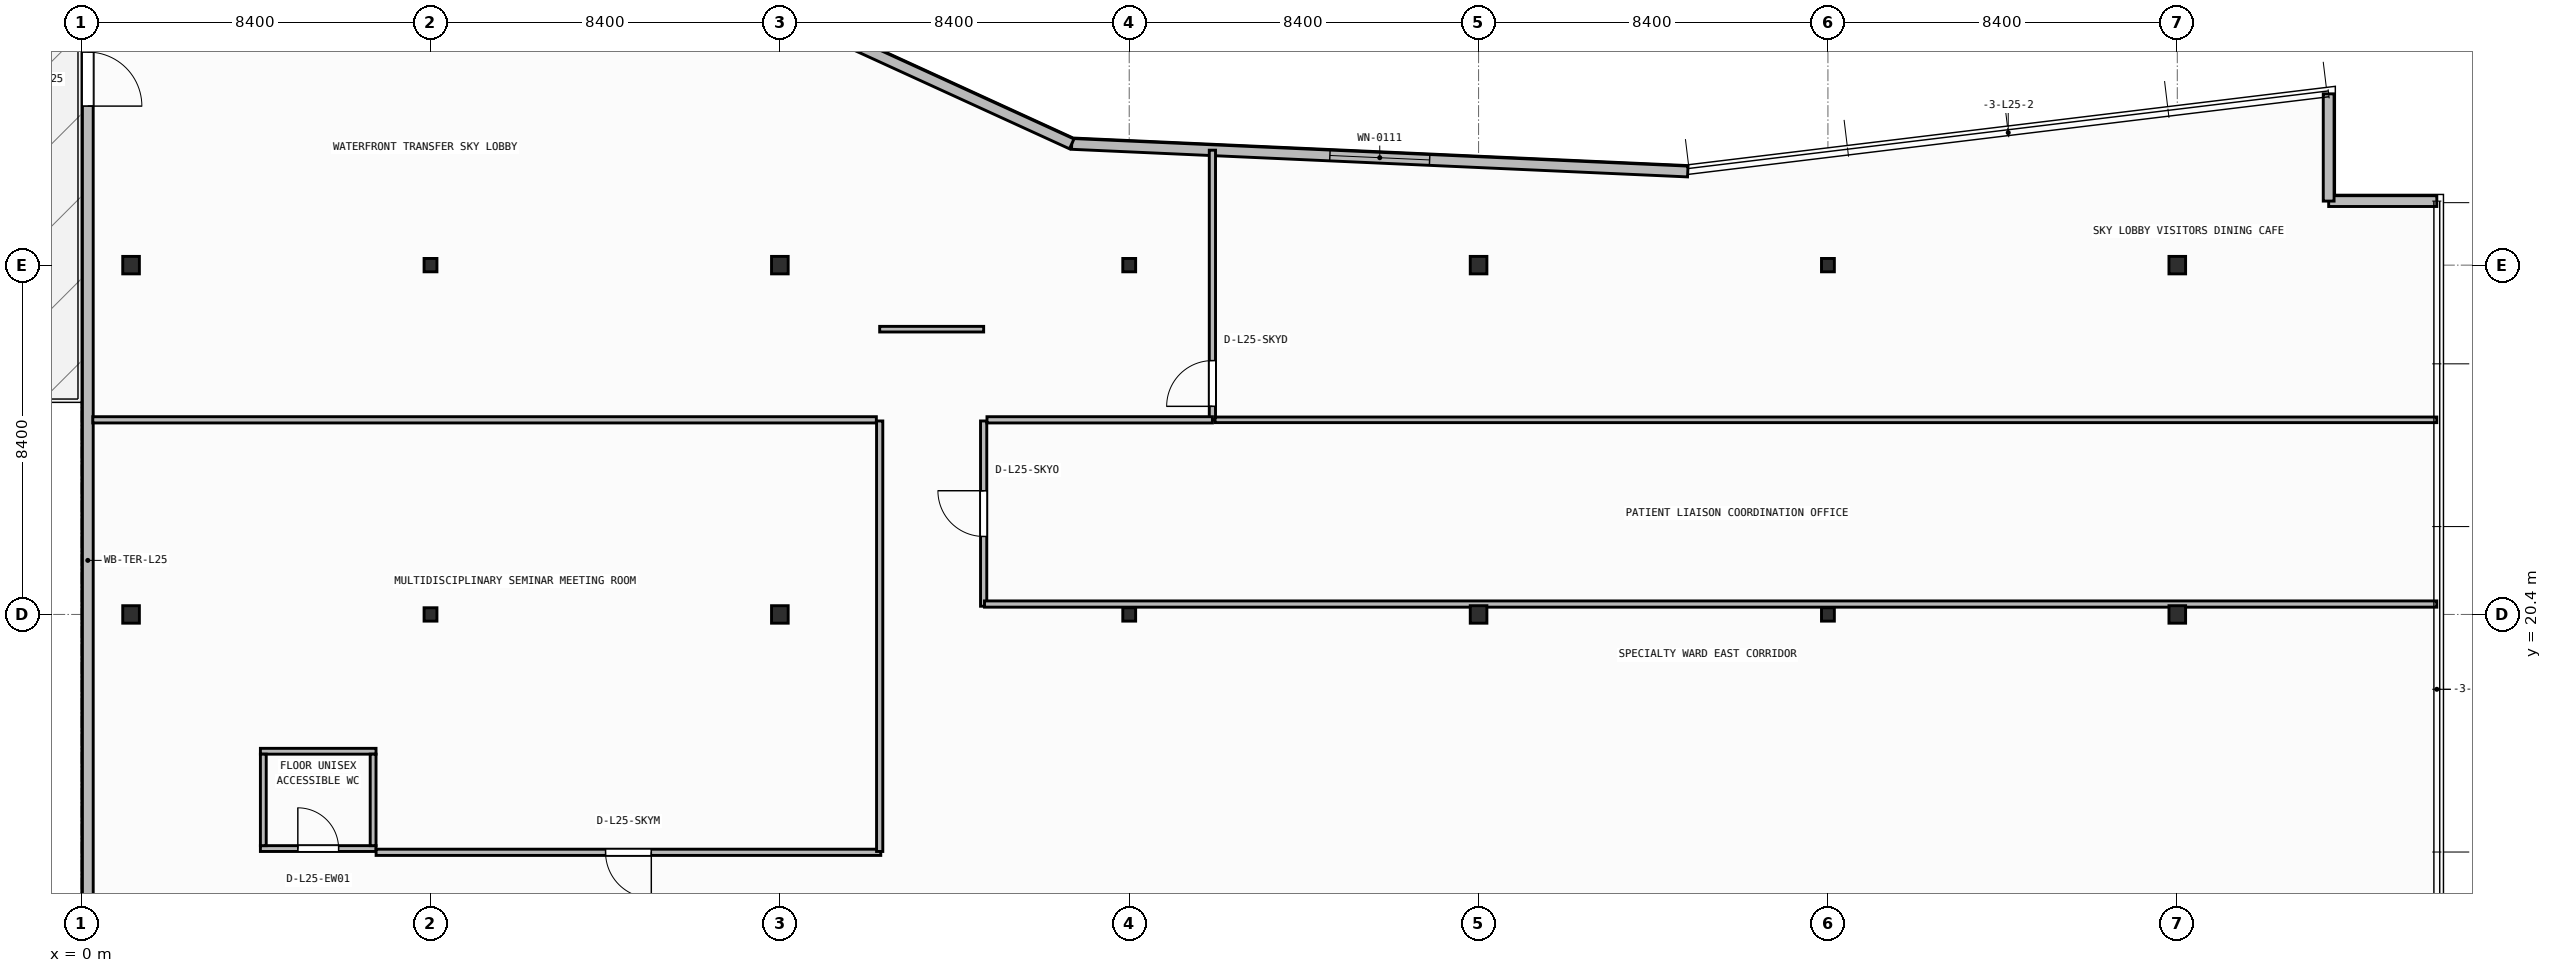
"""IFC4 building model, lengths in metres.
Left out: names, types, materials, properties, quantities, classifications, styles, units other than length and angle.
Written with IfcOpenShell. Run it as: python <this file> out.ifc"""

import sys

from ifc_helpers import new_model, si_unit, direction, frame, frame_2d, origin, origin_2d, place, context, subcontext, project, spatial, rectangle, i_section, extrude, element, fill, save


model = new_model("IFC4")
c1 = context("Model", 3, precision=1e-05, world=origin(), true_north=direction((0.0, 1.0)))
c2 = subcontext(c1, "Body", "Model", "MODEL_VIEW")
j1 = project(units=[si_unit("LENGTHUNIT", "METRE"), si_unit("PLANEANGLEUNIT", "RADIAN")], contexts=[c1])
p1 = place(None, origin())
s1 = spatial("IfcSite", under=j1, at=p1, CompositionType="ELEMENT")
p2 = place(p1, origin())
s2 = spatial("IfcBuilding", under=s1, at=p2, CompositionType="ELEMENT")
p3 = place(p2, frame((0.0, 0.0, 103.35)))
s3 = spatial("IfcBuildingStorey", under=s2, at=p3, CompositionType="ELEMENT", Elevation=103.35)
p4 = place(p3, frame((1.2, 20.4, 0.0), z_axis=(0.0, 0.0, 1.0), x_axis=(1.0, 0.0, 0.0)))
e1 = element("IfcColumn", 1, at=p4, inside=s3, PredefinedType="COLUMN", context=c2, shape_type="SweptSolid", body=[
    extrude(i_section(OverallWidth=0.4, OverallDepth=0.42, WebThickness=0.025, FlangeThickness=0.04, at=origin_2d()), origin(), (0.0, 0.0, 1.0), 3.95),
])
p5 = place(p3, frame((8.4, 20.4, 0.0), z_axis=(0.0, 0.0, 1.0), x_axis=(1.0, 0.0, 0.0)))
e2 = element("IfcColumn", 2, at=p5, inside=s3, PredefinedType="COLUMN", context=c2, shape_type="SweptSolid", body=[
    extrude(i_section(OverallWidth=0.309, OverallDepth=0.321, WebThickness=0.014, FlangeThickness=0.022, FilletRadius=0.017, at=origin_2d()), origin(), (0.0, 0.0, 1.0), 3.95),
])
p6 = place(p3, frame((16.8, 20.4, 0.0), z_axis=(0.0, 0.0, 1.0), x_axis=(1.0, 0.0, 0.0)))
e3 = element("IfcColumn", 3, at=p6, inside=s3, PredefinedType="COLUMN", context=c2, shape_type="SweptSolid", body=[
    extrude(i_section(OverallWidth=0.4, OverallDepth=0.42, WebThickness=0.025, FlangeThickness=0.04, at=origin_2d()), origin(), (0.0, 0.0, 1.0), 3.95),
])
p7 = place(p3, frame((25.2, 20.4, 0.0), z_axis=(0.0, 0.0, 1.0), x_axis=(1.0, 0.0, 0.0)))
e4 = element("IfcColumn", 4, at=p7, inside=s3, PredefinedType="COLUMN", context=c2, shape_type="SweptSolid", body=[
    extrude(i_section(OverallWidth=0.309, OverallDepth=0.321, WebThickness=0.014, FlangeThickness=0.022, FilletRadius=0.017, at=origin_2d()), origin(), (0.0, 0.0, 1.0), 3.95),
])
p8 = place(p3, frame((33.6, 20.4, 0.0), z_axis=(0.0, 0.0, 1.0), x_axis=(1.0, 0.0, 0.0)))
e5 = element("IfcColumn", 5, at=p8, inside=s3, PredefinedType="COLUMN", context=c2, shape_type="SweptSolid", body=[
    extrude(i_section(OverallWidth=0.4, OverallDepth=0.42, WebThickness=0.025, FlangeThickness=0.04, at=origin_2d()), origin(), (0.0, 0.0, 1.0), 3.95),
])
p9 = place(p3, frame((42.0, 20.4, 0.0), z_axis=(0.0, 0.0, 1.0), x_axis=(1.0, 0.0, 0.0)))
e6 = element("IfcColumn", 6, at=p9, inside=s3, PredefinedType="COLUMN", context=c2, shape_type="SweptSolid", body=[
    extrude(i_section(OverallWidth=0.309, OverallDepth=0.321, WebThickness=0.014, FlangeThickness=0.022, FilletRadius=0.017, at=origin_2d()), origin(), (0.0, 0.0, 1.0), 3.95),
])
for number, where, z_axis, x_axis in (
    (7, (50.4, 20.4, 0.0), (0.0, 0.0, 1.0), (1.0, 0.0, 0.0)),
    (8, (1.2, 28.8, 0.0), (0.0, 0.0, 1.0), (1.0, 0.0, 0.0)),
):
    element("IfcColumn", number, at=place(p3, frame(where, z_axis=z_axis, x_axis=x_axis)), inside=s3, PredefinedType="COLUMN", context=c2, shape_type="SweptSolid", body=[
        extrude(i_section(OverallWidth=0.4, OverallDepth=0.42, WebThickness=0.025, FlangeThickness=0.04, at=origin_2d()), origin(), (0.0, 0.0, 1.0), 3.95),
    ])
p10 = place(p3, frame((8.4, 28.8, 0.0), z_axis=(0.0, 0.0, 1.0), x_axis=(1.0, 0.0, 0.0)))
e9 = element("IfcColumn", 9, at=p10, inside=s3, PredefinedType="COLUMN", context=c2, shape_type="SweptSolid", body=[
    extrude(i_section(OverallWidth=0.309, OverallDepth=0.321, WebThickness=0.014, FlangeThickness=0.022, FilletRadius=0.017, at=origin_2d()), origin(), (0.0, 0.0, 1.0), 3.95),
])
p11 = place(p3, frame((16.8, 28.8, 0.0), z_axis=(0.0, 0.0, 1.0), x_axis=(1.0, 0.0, 0.0)))
e10 = element("IfcColumn", 10, at=p11, inside=s3, PredefinedType="COLUMN", context=c2, shape_type="SweptSolid", body=[
    extrude(i_section(OverallWidth=0.4, OverallDepth=0.42, WebThickness=0.025, FlangeThickness=0.04, at=origin_2d()), origin(), (0.0, 0.0, 1.0), 3.95),
])
p12 = place(p3, frame((25.2, 28.8, 0.0), z_axis=(0.0, 0.0, 1.0), x_axis=(1.0, 0.0, 0.0)))
e11 = element("IfcColumn", 11, at=p12, inside=s3, PredefinedType="COLUMN", context=c2, shape_type="SweptSolid", body=[
    extrude(i_section(OverallWidth=0.309, OverallDepth=0.321, WebThickness=0.014, FlangeThickness=0.022, FilletRadius=0.017, at=origin_2d()), origin(), (0.0, 0.0, 1.0), 3.95),
])
p13 = place(p3, frame((33.6, 28.8, 0.0), z_axis=(0.0, 0.0, 1.0), x_axis=(1.0, 0.0, 0.0)))
e12 = element("IfcColumn", 12, at=p13, inside=s3, PredefinedType="COLUMN", context=c2, shape_type="SweptSolid", body=[
    extrude(i_section(OverallWidth=0.4, OverallDepth=0.42, WebThickness=0.025, FlangeThickness=0.04, at=origin_2d()), origin(), (0.0, 0.0, 1.0), 3.95),
])
p14 = place(p3, frame((42.0, 28.8, 0.0), z_axis=(0.0, 0.0, 1.0), x_axis=(1.0, 0.0, 0.0)))
e13 = element("IfcColumn", 13, at=p14, inside=s3, PredefinedType="COLUMN", context=c2, shape_type="SweptSolid", body=[
    extrude(i_section(OverallWidth=0.309, OverallDepth=0.321, WebThickness=0.014, FlangeThickness=0.022, FilletRadius=0.017, at=origin_2d()), origin(), (0.0, 0.0, 1.0), 3.95),
])
p15 = place(p3, frame((50.4, 28.8, 0.0), z_axis=(0.0, 0.0, 1.0), x_axis=(1.0, 0.0, 0.0)))
e14 = element("IfcColumn", 14, at=p15, inside=s3, PredefinedType="COLUMN", context=c2, shape_type="SweptSolid", body=[
    extrude(i_section(OverallWidth=0.4, OverallDepth=0.42, WebThickness=0.025, FlangeThickness=0.04, at=origin_2d()), origin(), (0.0, 0.0, 1.0), 3.95),
])
p16 = place(p3, frame((56.64, 30.34, 0.0), z_axis=(0.0, 0.0, 1.0), x_axis=(-1.0, 0.0, 0.0)))
e15 = element("IfcWall", 15, at=p16, inside=s3, PredefinedType="STANDARD", context=c2, shape_type="SweptSolid", body=[
    extrude(rectangle(XDim=2.6, YDim=0.26, at=frame_2d((1.3, 0.0))), origin(), (0.0, 0.0, 1.0), 3.71),
])
p17 = place(p3, frame((54.04, 30.34, 0.0), z_axis=(0.0, 0.0, 1.0), x_axis=(0.0, 1.0, 0.0)))
e16 = element("IfcWall", 16, at=p17, inside=s3, PredefinedType="STANDARD", context=c2, shape_type="SweptSolid", body=[
    extrude(rectangle(XDim=2.579, YDim=0.26, at=frame_2d((1.29, 0.0))), origin(), (0.0, 0.0, 1.0), 3.71),
])
p18 = place(p3, frame((38.63, 31.052, 0.0), z_axis=(0.0, 0.0, 1.0), x_axis=(-0.998996592956, 0.044786239663, 0.0)))
e17 = element("IfcWall", 17, at=p18, inside=s3, PredefinedType="STANDARD", context=c2, shape_type="SweptSolid", body=[
    extrude(rectangle(XDim=14.827, YDim=0.26, at=frame_2d((7.414, 0.0))), origin(), (0.0, 0.0, 1.0), 3.71),
])
p19 = place(p18, frame((6.214, 0.0, 0.9)))
e18 = element("IfcOpeningElement", 18, at=p19, cuts=e17, PredefinedType="OPENING", context=c2, shape_type="SweptSolid", body=[
    extrude(rectangle(XDim=2.4, YDim=1.65, at=frame_2d((1.2, 0.825))), frame((0.0, 0.14, 0.0), z_axis=(0.0, -1.0, 0.0), x_axis=(1.0, 0.0, 0.0)), (0.0, 0.0, 1.0), 0.28),
])
p20 = place(p3, frame((23.818, 31.716, 0.0), z_axis=(0.0, 0.0, 1.0), x_axis=(-0.909209527513, 0.416338846471, 0.0)))
e19 = element("IfcWall", 19, at=p20, inside=s3, PredefinedType="STANDARD", context=c2, shape_type="SweptSolid", body=[
    extrude(rectangle(XDim=13.787, YDim=0.26, at=frame_2d((6.894, 0.0))), origin(), (0.0, 0.0, 1.0), 3.71),
])
p21 = place(p20, frame((5.694, 0.0, 0.9)))
e20 = element("IfcOpeningElement", 20, at=p21, cuts=e19, PredefinedType="OPENING", context=c2, shape_type="SweptSolid", body=[
    extrude(rectangle(XDim=2.4, YDim=1.65, at=frame_2d((1.2, 0.825))), frame((0.0, 0.14, 0.0), z_axis=(0.0, -1.0, 0.0), x_axis=(1.0, 0.0, 0.0)), (0.0, 0.0, 1.0), 0.28),
])
p22 = place(p3, frame((0.16, 40.64, 0.0), z_axis=(0.0, 0.0, 1.0), x_axis=(0.0, -1.0, 0.0)))
e21 = element("IfcWall", 21, at=p22, inside=s3, PredefinedType="STANDARD", context=c2, shape_type="SweptSolid", body=[
    extrude(rectangle(XDim=37.88, YDim=0.26, at=frame_2d((18.94, 0.0))), origin(), (0.0, 0.0, 1.0), 3.71),
])
p23 = place(p22, frame((6.716, 0.0, 0.0)))
e22 = element("IfcOpeningElement", 22, at=p23, cuts=e21, PredefinedType="OPENING", context=c2, shape_type="SweptSolid", body=[
    extrude(rectangle(XDim=1.3, YDim=2.15, at=frame_2d((0.65, 1.075))), frame((0.0, 0.14, 0.0), z_axis=(0.0, -1.0, 0.0), x_axis=(1.0, 0.0, 0.0)), (0.0, 0.0, 1.0), 0.28),
])
p24 = place(p3, frame((4.31, 14.77, 0.0), z_axis=(0.0, 0.0, 1.0), x_axis=(1.0, 0.0, 0.0)))
e23 = element("IfcWall", 23, at=p24, inside=s3, PredefinedType="PARTITIONING", context=c2, shape_type="SweptSolid", body=[
    extrude(rectangle(XDim=2.78, YDim=0.14, at=frame_2d((1.39, 0.0))), origin(), (0.0, 0.0, 1.0), 3.71),
])
p25 = place(p24, frame((0.9, 0.0, 0.0)))
e24 = element("IfcOpeningElement", 24, at=p25, cuts=e23, PredefinedType="OPENING", context=c2, shape_type="SweptSolid", body=[
    extrude(rectangle(XDim=0.98, YDim=2.1, at=frame_2d((0.49, 1.05))), frame((0.0, 0.08, 0.0), z_axis=(0.0, -1.0, 0.0), x_axis=(1.0, 0.0, 0.0)), (0.0, 0.0, 1.0), 0.16),
])
p26 = place(p3, frame((4.31, 17.11, 0.0), z_axis=(0.0, 0.0, 1.0), x_axis=(1.0, 0.0, 0.0)))
e25 = element("IfcWall", 25, at=p26, inside=s3, PredefinedType="PARTITIONING", context=c2, shape_type="SweptSolid", body=[
    extrude(rectangle(XDim=2.78, YDim=0.14, at=frame_2d((1.39, 0.0))), origin(), (0.0, 0.0, 1.0), 3.71),
])
for number, where, z_axis, x_axis in (
    (26, (4.38, 14.84, 0.0), (0.0, 0.0, 1.0), (0.0, 1.0, 0.0)),
    (27, (7.02, 14.84, 0.0), (0.0, 0.0, 1.0), (0.0, 1.0, 0.0)),
):
    element("IfcWall", number, at=place(p3, frame(where, z_axis=z_axis, x_axis=x_axis)), inside=s3, PredefinedType="PARTITIONING", context=c2, shape_type="SweptSolid", body=[
        extrude(rectangle(XDim=2.2, YDim=0.14, at=frame_2d((1.1, 0.0))), origin(), (0.0, 0.0, 1.0), 3.71),
    ])
p27 = place(p3, frame((19.226, 14.68, 0.0), z_axis=(0.0, 0.0, 1.0), x_axis=(-1.0, 0.0, 0.0)))
e28 = element("IfcWall", 28, at=p27, inside=s3, PredefinedType="PARTITIONING", context=c2, shape_type="SweptSolid", body=[
    extrude(rectangle(XDim=12.134, YDim=0.15, at=frame_2d((6.067, 0.0))), origin(), (0.0, 0.0, 1.0), 3.71),
])
p28 = place(p27, frame((5.517, 0.0, 0.0)))
e29 = element("IfcOpeningElement", 29, at=p28, cuts=e28, PredefinedType="OPENING", context=c2, shape_type="SweptSolid", body=[
    extrude(rectangle(XDim=1.1, YDim=2.1, at=frame_2d((0.55, 1.05))), frame((0.0, 0.085, 0.0), z_axis=(0.0, -1.0, 0.0), x_axis=(1.0, 0.0, 0.0)), (0.0, 0.0, 1.0), 0.17),
])
p29 = place(p3, frame((21.7, 27.26, 0.0), z_axis=(0.0, 0.0, 1.0), x_axis=(-1.0, 0.0, 0.0)))
e30 = element("IfcWall", 30, at=p29, inside=s3, PredefinedType="PARTITIONING", context=c2, shape_type="SweptSolid", body=[
    extrude(rectangle(XDim=2.5, YDim=0.135, at=frame_2d((1.25, 0.0))), origin(), (0.0, 0.0, 1.0), 3.71),
])
p30 = place(p3, frame((19.2, 25.052, 0.0), z_axis=(0.0, 0.0, 1.0), x_axis=(0.0, -1.0, 0.0)))
e31 = element("IfcWall", 31, at=p30, inside=s3, PredefinedType="PARTITIONING", context=c2, shape_type="SweptSolid", body=[
    extrude(rectangle(XDim=10.353, YDim=0.15, at=frame_2d((5.176, 0.0))), origin(), (0.0, 0.0, 1.0), 3.71),
])
p31 = place(p3, frame((21.7, 20.597, 0.0), z_axis=(0.0, 0.0, 1.0), x_axis=(0.0, 1.0, 0.0)))
e32 = element("IfcWall", 32, at=p31, inside=s3, PredefinedType="PARTITIONING", context=c2, shape_type="SweptSolid", body=[
    extrude(rectangle(XDim=4.455, YDim=0.15, at=frame_2d((2.228, 0.0))), origin(), (0.0, 0.0, 1.0), 3.71),
])
p32 = place(p31, frame((1.677, 0.0, 0.0)))
e33 = element("IfcOpeningElement", 33, at=p32, cuts=e32, PredefinedType="OPENING", context=c2, shape_type="SweptSolid", body=[
    extrude(rectangle(XDim=1.1, YDim=2.1, at=frame_2d((0.55, 1.05))), frame((0.0, 0.085, 0.0), z_axis=(0.0, -1.0, 0.0), x_axis=(1.0, 0.0, 0.0)), (0.0, 0.0, 1.0), 0.17),
])
p33 = place(p3, frame((56.64, 20.65, 0.0), z_axis=(0.0, 0.0, 1.0), x_axis=(-1.0, 0.0, 0.0)))
e34 = element("IfcWall", 34, at=p33, inside=s3, PredefinedType="PARTITIONING", context=c2, shape_type="SweptSolid", body=[
    extrude(rectangle(XDim=34.92, YDim=0.15, at=frame_2d((17.46, 0.0))), origin(), (0.0, 0.0, 1.0), 3.083),
])
p34 = place(p3, frame((27.2, 25.08, 0.0), z_axis=(0.0, 0.0, 1.0), x_axis=(0.0, 1.0, 0.0)))
e35 = element("IfcWall", 35, at=p34, inside=s3, PredefinedType="PARTITIONING", context=c2, shape_type="SweptSolid", body=[
    extrude(rectangle(XDim=6.484, YDim=0.15, at=frame_2d((3.242, 0.0))), origin(), (0.0, 0.0, 1.0), 3.71),
])
p35 = place(p34, frame((0.325, 0.0, 0.0)))
e36 = element("IfcOpeningElement", 36, at=p35, cuts=e35, PredefinedType="OPENING", context=c2, shape_type="SweptSolid", body=[
    extrude(rectangle(XDim=1.1, YDim=2.1, at=frame_2d((0.55, 1.05))), frame((0.0, 0.085, 0.0), z_axis=(0.0, -1.0, 0.0), x_axis=(1.0, 0.0, 0.0)), (0.0, 0.0, 1.0), 0.17),
])
p36 = place(p3, frame((0.28, 25.08, 0.0), z_axis=(0.0, 0.0, 1.0), x_axis=(1.0, 0.0, 0.0)))
e37 = element("IfcWall", 37, at=p36, inside=s3, PredefinedType="PARTITIONING", context=c2, shape_type="SweptSolid", body=[
    extrude(rectangle(XDim=18.84, YDim=0.15, at=frame_2d((9.42, 0.0))), origin(), (0.0, 0.0, 1.0), 3.381),
])
p37 = place(p3, frame((21.78, 25.08, 0.0), z_axis=(0.0, 0.0, 1.0), x_axis=(1.0, 0.0, 0.0)))
e38 = element("IfcWall", 38, at=p37, inside=s3, PredefinedType="PARTITIONING", context=c2, shape_type="SweptSolid", body=[
    extrude(rectangle(XDim=5.42, YDim=0.15, at=frame_2d((2.71, 0.0))), origin(), (0.0, 0.0, 1.0), 3.381),
])
p38 = place(p3, frame((27.265, 25.08, 0.0), z_axis=(0.0, 0.0, 1.0), x_axis=(1.0, 0.0, 0.0)))
e39 = element("IfcWall", 39, at=p38, inside=s3, PredefinedType="PARTITIONING", context=c2, shape_type="SweptSolid", body=[
    extrude(rectangle(XDim=29.375, YDim=0.135, at=frame_2d((14.688, 0.0))), origin(), (0.0, 0.0, 1.0), 3.381),
])
p39 = place(p19, origin())
e40 = element("IfcWindow", 40, at=p39, inside=s3, PartitioningType="SINGLE_PANEL", PredefinedType="WINDOW", context=c2, shape_type="SweptSolid", body=[
    extrude(rectangle(XDim=2.4, YDim=1.65, at=frame_2d((1.2, 0.825))), frame((0.0, 0.03, 0.0), z_axis=(0.0, -1.0, 0.0), x_axis=(1.0, 0.0, 0.0)), (0.0, 0.0, 1.0), 0.06),
])
fill(e18, e40)
p40 = place(p23, origin())
e41 = element("IfcDoor", 41, at=p40, inside=s3, OperationType="SINGLE_SWING_RIGHT", PredefinedType="DOOR", context=c2, shape_type="SweptSolid", body=[
    extrude(rectangle(XDim=1.3, YDim=2.15, at=frame_2d((0.65, 1.075))), frame((0.0, 0.025, 0.0), z_axis=(0.0, -1.0, 0.0), x_axis=(1.0, 0.0, 0.0)), (0.0, 0.0, 1.0), 0.05),
])
fill(e22, e41)
p41 = place(p25, origin())
e42 = element("IfcDoor", 42, at=p41, inside=s3, OperationType="SINGLE_SWING_LEFT", PredefinedType="DOOR", context=c2, shape_type="SweptSolid", body=[
    extrude(rectangle(XDim=0.98, YDim=2.1, at=frame_2d((0.49, 1.05))), frame((0.0, 0.025, 0.0), z_axis=(0.0, -1.0, 0.0), x_axis=(1.0, 0.0, 0.0)), (0.0, 0.0, 1.0), 0.05),
])
fill(e24, e42)
p42 = place(p28, origin())
e43 = element("IfcDoor", 43, at=p42, inside=s3, OperationType="SINGLE_SWING_LEFT", PredefinedType="DOOR", context=c2, shape_type="SweptSolid", body=[
    extrude(rectangle(XDim=1.1, YDim=2.1, at=frame_2d((0.55, 1.05))), frame((0.0, 0.025, 0.0), z_axis=(0.0, -1.0, 0.0), x_axis=(1.0, 0.0, 0.0)), (0.0, 0.0, 1.0), 0.05),
])
fill(e29, e43)
p43 = place(p32, origin())
e44 = element("IfcDoor", 44, at=p43, inside=s3, OperationType="SINGLE_SWING_RIGHT", PredefinedType="DOOR", context=c2, shape_type="SweptSolid", body=[
    extrude(rectangle(XDim=1.1, YDim=2.1, at=frame_2d((0.55, 1.05))), frame((0.0, 0.025, 0.0), z_axis=(0.0, -1.0, 0.0), x_axis=(1.0, 0.0, 0.0)), (0.0, 0.0, 1.0), 0.05),
])
fill(e33, e44)
p44 = place(p35, origin())
e45 = element("IfcDoor", 45, at=p44, inside=s3, OperationType="SINGLE_SWING_LEFT", PredefinedType="DOOR", context=c2, shape_type="SweptSolid", body=[
    extrude(rectangle(XDim=1.1, YDim=2.1, at=frame_2d((0.55, 1.05))), frame((0.0, 0.025, 0.0), z_axis=(0.0, -1.0, 0.0), x_axis=(1.0, 0.0, 0.0)), (0.0, 0.0, 1.0), 0.05),
])
fill(e36, e45)
save(model, sys.argv[1])
